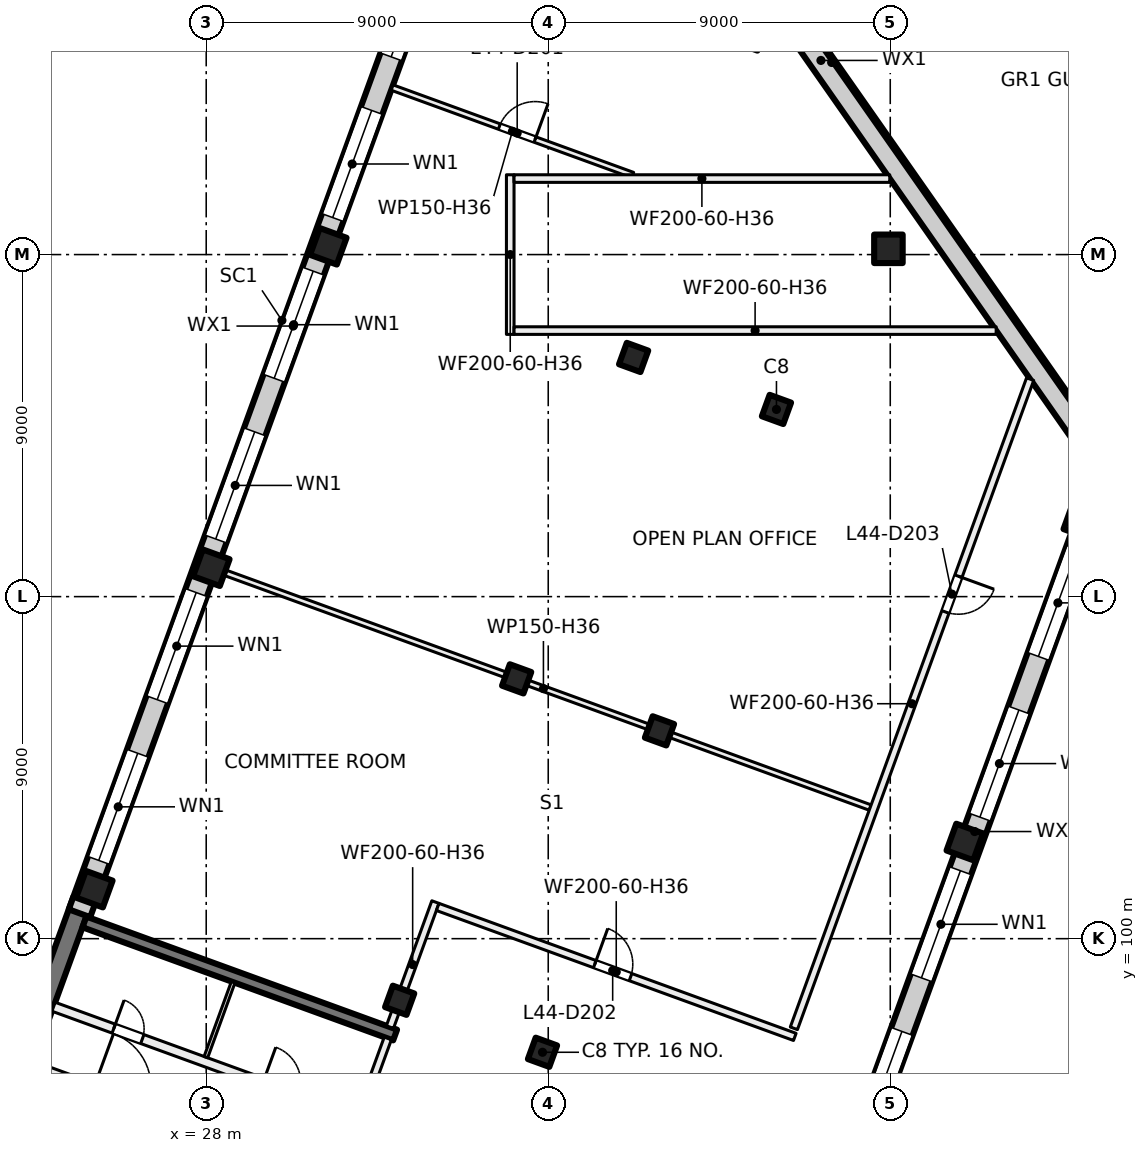
"""IFC4 building model, lengths in metres.
Left out: names, types, materials, properties, quantities, classifications, styles, units other than length and angle.
Written with IfcOpenShell. Run it as: python <this file> out.ifc"""

import sys

from ifc_helpers import new_model, si_unit, direction, frame, frame_2d, origin, origin_2d, place, context, subcontext, project, spatial, rectangle, extrude, element, fill, save


model = new_model("IFC4")
c1 = context("Model", 3, precision=1e-05, world=origin(), true_north=direction((0.0, 1.0)))
c2 = subcontext(c1, "Body", "Model", "MODEL_VIEW")
j1 = project(units=[si_unit("LENGTHUNIT", "METRE"), si_unit("PLANEANGLEUNIT", "RADIAN")], contexts=[c1])
p1 = place(None, origin())
s1 = spatial("IfcSite", under=j1, at=p1, CompositionType="ELEMENT")
p2 = place(p1, origin())
s2 = spatial("IfcBuilding", under=s1, at=p2, CompositionType="ELEMENT")
p3 = place(p2, frame((0.0, 0.0, 188.0)))
s3 = spatial("IfcBuildingStorey", under=s2, at=p3, CompositionType="ELEMENT", Elevation=188.0)
p4 = place(p3, frame((45.952, 118.152, 0.0), z_axis=(0.0, 0.0, 1.0), x_axis=(1.0, 0.0, 0.0)))
e1 = element("IfcColumn", 1, at=p4, inside=s3, PredefinedType="COLUMN", context=c2, shape_type="SweptSolid", body=[
    extrude(rectangle(XDim=0.75, YDim=0.75, at=origin_2d()), origin(), (0.0, 0.0, 1.0), 4.0),
])
for number, where, z_axis, x_axis in (
    (2, (43.006, 113.925, 0.0), (0.0, 0.0, 1.0), (-0.342, -0.94, 0.0)),
    (3, (39.927, 105.468, 0.0), (0.0, 0.0, 1.0), (-0.342, -0.94, 0.0)),
    (4, (36.849, 97.011, 0.0), (0.0, 0.0, 1.0), (-0.342, -0.94, 0.0)),
    (5, (39.247, 115.293, 0.0), (0.0, 0.0, 1.0), (-0.342, -0.94, 0.0)),
    (6, (36.169, 106.836, 0.0), (0.0, 0.0, 1.0), (-0.342, -0.94, 0.0)),
    (7, (33.091, 98.379, 0.0), (0.0, 0.0, 1.0), (-0.342, -0.94, 0.0)),
):
    element("IfcColumn", number, at=place(p3, frame(where, z_axis=z_axis, x_axis=x_axis)), inside=s3, PredefinedType="COLUMN", context=c2, shape_type="SweptSolid", body=[
        extrude(rectangle(XDim=0.6, YDim=0.6, at=origin_2d()), origin(), (0.0, 0.0, 1.0), 4.0),
    ])
for number, where, z_axis, x_axis in (
    (8, (51.04, 111.001, 0.0), (0.0, 0.0, 1.0), (-0.342, -0.94, 0.0)),
    (9, (47.962, 102.544, 0.0), (0.0, 0.0, 1.0), (-0.342, -0.94, 0.0)),
    (10, (31.212, 118.218, 0.0), (0.0, 0.0, 1.0), (-0.342, -0.94, 0.0)),
    (11, (28.134, 109.76, 0.0), (0.0, 0.0, 1.0), (-0.342, -0.94, 0.0)),
    (12, (25.056, 101.303, 0.0), (0.0, 0.0, 1.0), (-0.342, -0.94, 0.0)),
):
    element("IfcColumn", number, at=place(p3, frame(where, z_axis=z_axis, x_axis=x_axis)), inside=s3, PredefinedType="COLUMN", context=c2, shape_type="SweptSolid", body=[
        extrude(rectangle(XDim=0.75, YDim=0.75, at=origin_2d()), origin(), (0.0, 0.0, 1.0), 4.0),
    ])
p5 = place(p3, frame((21.67, 92.585, 0.0), z_axis=(0.0, 0.0, 1.0), x_axis=(0.342035714298, 0.93968695327, 0.0)))
e13 = element("IfcWall", 13, at=p5, inside=s3, PredefinedType="SHEAR", context=c2, shape_type="SweptSolid", body=[
    extrude(rectangle(XDim=8.975, YDim=0.5, at=frame_2d((4.488, 0.0))), origin(), (0.0, 0.0, 1.0), 4.0),
])
p6 = place(p3, frame((32.971, 97.465, 0.0), z_axis=(0.0, 0.0, 1.0), x_axis=(-0.939695066972, 0.34201342241, 0.0)))
e14 = element("IfcWall", 14, at=p6, inside=s3, PredefinedType="SHEAR", context=c2, shape_type="SweptSolid", body=[
    extrude(rectangle(XDim=8.7, YDim=0.3, at=frame_2d((4.35, 0.0))), origin(), (0.0, 0.0, 1.0), 4.0),
])
p7 = place(p3, frame((58.694, 117.369, 0.0), z_axis=(0.0, 0.0, 1.0), x_axis=(-0.573579564522, 0.819149853911, 0.0)))
e15 = element("IfcWall", 15, at=p7, inside=s3, PredefinedType="SOLIDWALL", context=c2, shape_type="SweptSolid", body=[
    extrude(rectangle(XDim=26.138, YDim=0.6, at=frame_2d((13.069, 0.0))), origin(), (0.0, 0.0, 1.0), 3.625),
])
p8 = place(p3, frame((51.668, 112.289, 0.0), z_axis=(0.0, 0.0, 1.0), x_axis=(-0.342020240414, -0.939692585449, 0.0)))
e16 = element("IfcWall", 16, at=p8, inside=s3, PredefinedType="SOLIDWALL", context=c2, shape_type="SweptSolid", body=[
    extrude(rectangle(XDim=20.155, YDim=0.6, at=frame_2d((10.077, 0.0))), origin(), (0.0, 0.0, 1.0), 3.625),
])
p9 = place(p8, frame((2.175, 0.0, 0.9)))
e17 = element("IfcOpeningElement", 17, at=p9, cuts=e16, PredefinedType="OPENING", context=c2, shape_type="SweptSolid", body=[
    extrude(rectangle(XDim=3.0, YDim=2.4, at=frame_2d((1.5, 1.2))), frame((0.0, 0.31, 0.0), z_axis=(0.0, -1.0, 0.0), x_axis=(1.0, 0.0, 0.0)), (0.0, 0.0, 1.0), 0.62),
])
p10 = place(p8, frame((6.675, 0.0, 0.9)))
e18 = element("IfcOpeningElement", 18, at=p10, cuts=e16, PredefinedType="OPENING", context=c2, shape_type="SweptSolid", body=[
    extrude(rectangle(XDim=3.0, YDim=2.4, at=frame_2d((1.5, 1.2))), frame((0.0, 0.31, 0.0), z_axis=(0.0, -1.0, 0.0), x_axis=(1.0, 0.0, 0.0)), (0.0, 0.0, 1.0), 0.62),
])
p11 = place(p8, frame((11.175, 0.0, 0.9)))
e19 = element("IfcOpeningElement", 19, at=p11, cuts=e16, PredefinedType="OPENING", context=c2, shape_type="SweptSolid", body=[
    extrude(rectangle(XDim=3.0, YDim=2.4, at=frame_2d((1.5, 1.2))), frame((0.0, 0.31, 0.0), z_axis=(0.0, -1.0, 0.0), x_axis=(1.0, 0.0, 0.0)), (0.0, 0.0, 1.0), 0.62),
])
p12 = place(p8, frame((15.675, 0.0, 0.9)))
e20 = element("IfcOpeningElement", 20, at=p12, cuts=e16, PredefinedType="OPENING", context=c2, shape_type="SweptSolid", body=[
    extrude(rectangle(XDim=3.0, YDim=2.4, at=frame_2d((1.5, 1.2))), frame((0.0, 0.31, 0.0), z_axis=(0.0, -1.0, 0.0), x_axis=(1.0, 0.0, 0.0)), (0.0, 0.0, 1.0), 0.62),
])
p13 = place(p3, frame((36.657, 133.847, 0.0), z_axis=(0.0, 0.0, 1.0), x_axis=(0.573575458379, -0.819152729072, 0.0)))
e21 = element("IfcWall", 21, at=p13, inside=s3, PredefinedType="SOLIDWALL", context=c2, shape_type="SweptSolid", body=[
    extrude(rectangle(XDim=26.218, YDim=0.6, at=frame_2d((13.109, 0.0))), origin(), (0.0, 0.0, 1.0), 3.625),
])
p14 = place(p3, frame((24.666, 100.669, 0.0), z_axis=(0.0, 0.0, 1.0), x_axis=(0.34201964167, 0.939692803373, 0.0)))
e22 = element("IfcWall", 22, at=p14, inside=s3, PredefinedType="SOLIDWALL", context=c2, shape_type="SweptSolid", body=[
    extrude(rectangle(XDim=32.884, YDim=0.6, at=frame_2d((16.442, 0.0))), origin(), (0.0, 0.0, 1.0), 3.625),
])
p15 = place(p14, frame((1.48, 0.0, 0.9)))
e23 = element("IfcOpeningElement", 23, at=p15, cuts=e22, PredefinedType="OPENING", context=c2, shape_type="SweptSolid", body=[
    extrude(rectangle(XDim=3.0, YDim=2.4, at=frame_2d((1.5, 1.2))), frame((0.0, 0.31, 0.0), z_axis=(0.0, -1.0, 0.0), x_axis=(1.0, 0.0, 0.0)), (0.0, 0.0, 1.0), 0.62),
])
p16 = place(p14, frame((5.98, 0.0, 0.9)))
e24 = element("IfcOpeningElement", 24, at=p16, cuts=e22, PredefinedType="OPENING", context=c2, shape_type="SweptSolid", body=[
    extrude(rectangle(XDim=3.0, YDim=2.4, at=frame_2d((1.5, 1.2))), frame((0.0, 0.31, 0.0), z_axis=(0.0, -1.0, 0.0), x_axis=(1.0, 0.0, 0.0)), (0.0, 0.0, 1.0), 0.62),
])
p17 = place(p14, frame((10.48, 0.0, 0.9)))
e25 = element("IfcOpeningElement", 25, at=p17, cuts=e22, PredefinedType="OPENING", context=c2, shape_type="SweptSolid", body=[
    extrude(rectangle(XDim=3.0, YDim=2.4, at=frame_2d((1.5, 1.2))), frame((0.0, 0.31, 0.0), z_axis=(0.0, -1.0, 0.0), x_axis=(1.0, 0.0, 0.0)), (0.0, 0.0, 1.0), 0.62),
])
p18 = place(p14, frame((14.98, 0.0, 0.9)))
e26 = element("IfcOpeningElement", 26, at=p18, cuts=e22, PredefinedType="OPENING", context=c2, shape_type="SweptSolid", body=[
    extrude(rectangle(XDim=3.0, YDim=2.4, at=frame_2d((1.5, 1.2))), frame((0.0, 0.31, 0.0), z_axis=(0.0, -1.0, 0.0), x_axis=(1.0, 0.0, 0.0)), (0.0, 0.0, 1.0), 0.62),
])
p19 = place(p14, frame((19.48, 0.0, 0.9)))
e27 = element("IfcOpeningElement", 27, at=p19, cuts=e22, PredefinedType="OPENING", context=c2, shape_type="SweptSolid", body=[
    extrude(rectangle(XDim=3.0, YDim=2.4, at=frame_2d((1.5, 1.2))), frame((0.0, 0.31, 0.0), z_axis=(0.0, -1.0, 0.0), x_axis=(1.0, 0.0, 0.0)), (0.0, 0.0, 1.0), 0.62),
])
p20 = place(p14, frame((23.98, 0.0, 0.9)))
e28 = element("IfcOpeningElement", 28, at=p20, cuts=e22, PredefinedType="OPENING", context=c2, shape_type="SweptSolid", body=[
    extrude(rectangle(XDim=3.0, YDim=2.4, at=frame_2d((1.5, 1.2))), frame((0.0, 0.31, 0.0), z_axis=(0.0, -1.0, 0.0), x_axis=(1.0, 0.0, 0.0)), (0.0, 0.0, 1.0), 0.62),
])
p21 = place(p14, frame((28.48, 0.0, 0.9)))
e29 = element("IfcOpeningElement", 29, at=p21, cuts=e22, PredefinedType="OPENING", context=c2, shape_type="SweptSolid", body=[
    extrude(rectangle(XDim=3.0, YDim=2.4, at=frame_2d((1.5, 1.2))), frame((0.0, 0.31, 0.0), z_axis=(0.0, -1.0, 0.0), x_axis=(1.0, 0.0, 0.0)), (0.0, 0.0, 1.0), 0.62),
])
p22 = place(p3, frame((31.427, 93.663, 0.0), z_axis=(0.0, 0.0, 1.0), x_axis=(0.342030870568, 0.93968871632, 0.0)))
e30 = element("IfcWall", 30, at=p22, inside=s3, PredefinedType="PARTITIONING", context=c2, shape_type="SweptSolid", body=[
    extrude(rectangle(XDim=3.95, YDim=0.2, at=frame_2d((1.975, 0.0))), origin(), (0.0, 0.0, 1.0), 3.625),
])
p23 = place(p22, frame((0.3, 0.0, 0.0)))
e31 = element("IfcOpeningElement", 31, at=p23, cuts=e30, PredefinedType="OPENING", context=c2, shape_type="SweptSolid", body=[
    extrude(rectangle(XDim=1.2, YDim=2.1, at=frame_2d((0.6, 1.05))), frame((0.0, 0.11, 0.0), z_axis=(0.0, -1.0, 0.0), x_axis=(1.0, 0.0, 0.0)), (0.0, 0.0, 1.0), 0.22),
])
p24 = place(p3, frame((23.427, 96.682, 0.0), z_axis=(0.0, 0.0, 1.0), x_axis=(0.939690465531, -0.342026064782, 0.0)))
e32 = element("IfcWall", 32, at=p24, inside=s3, PredefinedType="PARTITIONING", context=c2, shape_type="SweptSolid", body=[
    extrude(rectangle(XDim=8.45, YDim=0.2, at=frame_2d((4.225, 0.0))), origin(), (0.0, 0.0, 1.0), 3.625),
])
p25 = place(p24, frame((1.725, 0.0, 0.0)))
e33 = element("IfcOpeningElement", 33, at=p25, cuts=e32, PredefinedType="OPENING", context=c2, shape_type="SweptSolid", body=[
    extrude(rectangle(XDim=1.5, YDim=2.1, at=frame_2d((0.75, 1.05))), frame((0.0, 0.11, 0.0), z_axis=(0.0, -1.0, 0.0), x_axis=(1.0, 0.0, 0.0)), (0.0, 0.0, 1.0), 0.22),
])
p26 = place(p3, frame((23.983, 98.208, 0.0), z_axis=(0.0, 0.0, 1.0), x_axis=(0.939699751196, -0.342000552051, 0.0)))
e34 = element("IfcWall", 34, at=p26, inside=s3, PredefinedType="PARTITIONING", context=c2, shape_type="SweptSolid", body=[
    extrude(rectangle(XDim=8.45, YDim=0.25, at=frame_2d((4.225, 0.0))), origin(), (0.0, 0.0, 1.0), 3.625),
])
p27 = place(p26, frame((5.86, 0.0, 0.0)))
e35 = element("IfcOpeningElement", 35, at=p27, cuts=e34, PredefinedType="OPENING", context=c2, shape_type="SweptSolid", body=[
    extrude(rectangle(XDim=1.0, YDim=2.1, at=frame_2d((0.5, 1.05))), frame((0.0, 0.135, 0.0), z_axis=(0.0, -1.0, 0.0), x_axis=(1.0, 0.0, 0.0)), (0.0, 0.0, 1.0), 0.27),
])
p28 = place(p26, frame((1.685, 0.0, 0.0)))
e36 = element("IfcOpeningElement", 36, at=p28, cuts=e34, PredefinedType="OPENING", context=c2, shape_type="SweptSolid", body=[
    extrude(rectangle(XDim=0.8, YDim=2.1, at=frame_2d((0.4, 1.05))), frame((0.0, 0.135, 0.0), z_axis=(0.0, -1.0, 0.0), x_axis=(1.0, 0.0, 0.0)), (0.0, 0.0, 1.0), 0.27),
])
p29 = place(p3, frame((27.991, 96.883, 0.0), z_axis=(0.0, 0.0, 1.0), x_axis=(0.342023078919, 0.939691552312, 0.0)))
e37 = element("IfcWall", 37, at=p29, inside=s3, PredefinedType="PARTITIONING", context=c2, shape_type="SweptSolid", body=[
    extrude(rectangle(XDim=2.1, YDim=0.1, at=frame_2d((1.05, 0.0))), origin(), (0.0, 0.0, 1.0), 3.625),
])
p30 = place(p3, frame((28.275, 109.709, 0.0), z_axis=(0.0, 0.0, 1.0), x_axis=(0.939695619185, -0.342011905181, 0.0)))
e38 = element("IfcWall", 38, at=p30, inside=s3, PredefinedType="PARTITIONING", context=c2, shape_type="SweptSolid", body=[
    extrude(rectangle(XDim=18.301, YDim=0.15, at=frame_2d((9.15, 0.0))), origin(), (0.0, 0.0, 1.0), 3.625),
])
p31 = place(p3, frame((32.834, 97.674, 0.0), z_axis=(0.0, 0.0, 1.0), x_axis=(0.342017493073, 0.939693585395, 0.0)))
e39 = element("IfcWall", 39, at=p31, inside=s3, PredefinedType="PARTITIONING", context=c2, shape_type="SweptSolid", body=[
    extrude(rectangle(XDim=3.5, YDim=0.2, at=frame_2d((1.75, 0.0))), origin(), (0.0, 0.0, 1.0), 3.625),
])
p32 = place(p3, frame((39.223, 120.091, 0.0), z_axis=(0.0, 0.0, 1.0), x_axis=(-0.939705573142, 0.341984554924, 0.0)))
e40 = element("IfcWall", 40, at=p32, inside=s3, PredefinedType="PARTITIONING", context=c2, shape_type="SweptSolid", body=[
    extrude(rectangle(XDim=6.737, YDim=0.15, at=frame_2d((3.369, 0.0))), origin(), (0.0, 0.0, 1.0), 3.625),
])
p33 = place(p32, frame((2.735, 0.0, 0.0)))
e41 = element("IfcOpeningElement", 41, at=p33, cuts=e40, PredefinedType="OPENING", context=c2, shape_type="SweptSolid", body=[
    extrude(rectangle(XDim=1.0, YDim=2.1, at=frame_2d((0.5, 1.05))), frame((0.0, 0.085, 0.0), z_axis=(0.0, -1.0, 0.0), x_axis=(1.0, 0.0, 0.0)), (0.0, 0.0, 1.0), 0.17),
])
p34 = place(p3, frame((34.091, 100.835, 0.0), z_axis=(0.0, 0.0, 1.0), x_axis=(0.939702148643, -0.341993964619, 0.0)))
e42 = element("IfcWall", 42, at=p34, inside=s3, PredefinedType="PARTITIONING", context=c2, shape_type="SweptSolid", body=[
    extrude(rectangle(XDim=10.0, YDim=0.2, at=frame_2d((5.0, 0.0))), origin(), (0.0, 0.0, 1.0), 3.625),
])
p35 = place(p34, frame((4.4, 0.0, 0.0)))
e43 = element("IfcOpeningElement", 43, at=p35, cuts=e42, PredefinedType="OPENING", context=c2, shape_type="SweptSolid", body=[
    extrude(rectangle(XDim=1.0, YDim=2.1, at=frame_2d((0.5, 1.05))), frame((0.0, 0.11, 0.0), z_axis=(0.0, -1.0, 0.0), x_axis=(1.0, 0.0, 0.0)), (0.0, 0.0, 1.0), 0.22),
])
p36 = place(p3, frame((36.0, 115.9, 0.0), z_axis=(0.0, 0.0, 1.0), x_axis=(0.0, 1.0, 0.0)))
e44 = element("IfcWall", 44, at=p36, inside=s3, PredefinedType="PARTITIONING", context=c2, shape_type="SweptSolid", body=[
    extrude(rectangle(XDim=4.2, YDim=0.2, at=frame_2d((2.1, 0.0))), origin(), (0.0, 0.0, 1.0), 3.625),
])
p37 = place(p3, frame((36.1, 116.0, 0.0), z_axis=(0.0, 0.0, 1.0), x_axis=(1.0, 0.0, 0.0)))
e45 = element("IfcWall", 45, at=p37, inside=s3, PredefinedType="PARTITIONING", context=c2, shape_type="SweptSolid", body=[
    extrude(rectangle(XDim=12.687, YDim=0.2, at=frame_2d((6.344, 0.0))), origin(), (0.0, 0.0, 1.0), 3.625),
])
p38 = place(p3, frame((36.1, 120.0, 0.0), z_axis=(0.0, 0.0, 1.0), x_axis=(1.0, 0.0, 0.0)))
e46 = element("IfcWall", 46, at=p38, inside=s3, PredefinedType="PARTITIONING", context=c2, shape_type="SweptSolid", body=[
    extrude(rectangle(XDim=9.887, YDim=0.2, at=frame_2d((4.943, 0.0))), origin(), (0.0, 0.0, 1.0), 3.625),
])
p39 = place(p3, frame((43.464, 97.641, 0.0), z_axis=(0.0, 0.0, 1.0), x_axis=(0.341997546278, 0.939700845131, 0.0)))
e47 = element("IfcWall", 47, at=p39, inside=s3, PredefinedType="PARTITIONING", context=c2, shape_type="SweptSolid", body=[
    extrude(rectangle(XDim=18.178, YDim=0.2, at=frame_2d((9.089, 0.0))), origin(), (0.0, 0.0, 1.0), 3.625),
])
p40 = place(p39, frame((11.659, 0.0, 0.0)))
e48 = element("IfcOpeningElement", 48, at=p40, cuts=e47, PredefinedType="OPENING", context=c2, shape_type="SweptSolid", body=[
    extrude(rectangle(XDim=1.0, YDim=2.1, at=frame_2d((0.5, 1.05))), frame((0.0, 0.11, 0.0), z_axis=(0.0, -1.0, 0.0), x_axis=(1.0, 0.0, 0.0)), (0.0, 0.0, 1.0), 0.22),
])
p41 = place(p9, origin())
e49 = element("IfcWindow", 49, at=p41, inside=s3, PartitioningType="SINGLE_PANEL", PredefinedType="WINDOW", context=c2, shape_type="SweptSolid", body=[
    extrude(rectangle(XDim=3.0, YDim=2.4, at=frame_2d((1.5, 1.2))), frame((0.0, 0.03, 0.0), z_axis=(0.0, -1.0, 0.0), x_axis=(1.0, 0.0, 0.0)), (0.0, 0.0, 1.0), 0.06),
])
fill(e17, e49)
p42 = place(p10, origin())
e50 = element("IfcWindow", 50, at=p42, inside=s3, PartitioningType="SINGLE_PANEL", PredefinedType="WINDOW", context=c2, shape_type="SweptSolid", body=[
    extrude(rectangle(XDim=3.0, YDim=2.4, at=frame_2d((1.5, 1.2))), frame((0.0, 0.03, 0.0), z_axis=(0.0, -1.0, 0.0), x_axis=(1.0, 0.0, 0.0)), (0.0, 0.0, 1.0), 0.06),
])
fill(e18, e50)
p43 = place(p11, origin())
e51 = element("IfcWindow", 51, at=p43, inside=s3, PartitioningType="SINGLE_PANEL", PredefinedType="WINDOW", context=c2, shape_type="SweptSolid", body=[
    extrude(rectangle(XDim=3.0, YDim=2.4, at=frame_2d((1.5, 1.2))), frame((0.0, 0.03, 0.0), z_axis=(0.0, -1.0, 0.0), x_axis=(1.0, 0.0, 0.0)), (0.0, 0.0, 1.0), 0.06),
])
fill(e19, e51)
p44 = place(p12, origin())
e52 = element("IfcWindow", 52, at=p44, inside=s3, PartitioningType="SINGLE_PANEL", PredefinedType="WINDOW", context=c2, shape_type="SweptSolid", body=[
    extrude(rectangle(XDim=3.0, YDim=2.4, at=frame_2d((1.5, 1.2))), frame((0.0, 0.03, 0.0), z_axis=(0.0, -1.0, 0.0), x_axis=(1.0, 0.0, 0.0)), (0.0, 0.0, 1.0), 0.06),
])
fill(e20, e52)
p45 = place(p15, origin())
e53 = element("IfcWindow", 53, at=p45, inside=s3, PartitioningType="SINGLE_PANEL", PredefinedType="WINDOW", context=c2, shape_type="SweptSolid", body=[
    extrude(rectangle(XDim=3.0, YDim=2.4, at=frame_2d((1.5, 1.2))), frame((0.0, 0.03, 0.0), z_axis=(0.0, -1.0, 0.0), x_axis=(1.0, 0.0, 0.0)), (0.0, 0.0, 1.0), 0.06),
])
fill(e23, e53)
p46 = place(p16, origin())
e54 = element("IfcWindow", 54, at=p46, inside=s3, PartitioningType="SINGLE_PANEL", PredefinedType="WINDOW", context=c2, shape_type="SweptSolid", body=[
    extrude(rectangle(XDim=3.0, YDim=2.4, at=frame_2d((1.5, 1.2))), frame((0.0, 0.03, 0.0), z_axis=(0.0, -1.0, 0.0), x_axis=(1.0, 0.0, 0.0)), (0.0, 0.0, 1.0), 0.06),
])
fill(e24, e54)
p47 = place(p17, origin())
e55 = element("IfcWindow", 55, at=p47, inside=s3, PartitioningType="SINGLE_PANEL", PredefinedType="WINDOW", context=c2, shape_type="SweptSolid", body=[
    extrude(rectangle(XDim=3.0, YDim=2.4, at=frame_2d((1.5, 1.2))), frame((0.0, 0.03, 0.0), z_axis=(0.0, -1.0, 0.0), x_axis=(1.0, 0.0, 0.0)), (0.0, 0.0, 1.0), 0.06),
])
fill(e25, e55)
p48 = place(p18, origin())
e56 = element("IfcWindow", 56, at=p48, inside=s3, PartitioningType="SINGLE_PANEL", PredefinedType="WINDOW", context=c2, shape_type="SweptSolid", body=[
    extrude(rectangle(XDim=3.0, YDim=2.4, at=frame_2d((1.5, 1.2))), frame((0.0, 0.03, 0.0), z_axis=(0.0, -1.0, 0.0), x_axis=(1.0, 0.0, 0.0)), (0.0, 0.0, 1.0), 0.06),
])
fill(e26, e56)
p49 = place(p19, origin())
e57 = element("IfcWindow", 57, at=p49, inside=s3, PartitioningType="SINGLE_PANEL", PredefinedType="WINDOW", context=c2, shape_type="SweptSolid", body=[
    extrude(rectangle(XDim=3.0, YDim=2.4, at=frame_2d((1.5, 1.2))), frame((0.0, 0.03, 0.0), z_axis=(0.0, -1.0, 0.0), x_axis=(1.0, 0.0, 0.0)), (0.0, 0.0, 1.0), 0.06),
])
fill(e27, e57)
p50 = place(p20, origin())
e58 = element("IfcWindow", 58, at=p50, inside=s3, PartitioningType="SINGLE_PANEL", PredefinedType="WINDOW", context=c2, shape_type="SweptSolid", body=[
    extrude(rectangle(XDim=3.0, YDim=2.4, at=frame_2d((1.5, 1.2))), frame((0.0, 0.03, 0.0), z_axis=(0.0, -1.0, 0.0), x_axis=(1.0, 0.0, 0.0)), (0.0, 0.0, 1.0), 0.06),
])
fill(e28, e58)
p51 = place(p28, origin())
e59 = element("IfcDoor", 59, at=p51, inside=s3, OperationType="SINGLE_SWING_RIGHT", PredefinedType="DOOR", context=c2, shape_type="SweptSolid", body=[
    extrude(rectangle(XDim=0.8, YDim=2.1, at=frame_2d((0.4, 1.05))), frame((0.0, 0.025, 0.0), z_axis=(0.0, -1.0, 0.0), x_axis=(1.0, 0.0, 0.0)), (0.0, 0.0, 1.0), 0.05),
])
fill(e36, e59)
p52 = place(p33, origin())
e60 = element("IfcDoor", 60, at=p52, inside=s3, OperationType="SINGLE_SWING_LEFT", PredefinedType="DOOR", context=c2, shape_type="SweptSolid", body=[
    extrude(rectangle(XDim=1.0, YDim=2.1, at=frame_2d((0.5, 1.05))), frame((0.0, 0.025, 0.0), z_axis=(0.0, -1.0, 0.0), x_axis=(1.0, 0.0, 0.0)), (0.0, 0.0, 1.0), 0.05),
])
fill(e41, e60)
p53 = place(p35, origin())
e61 = element("IfcDoor", 61, at=p53, inside=s3, OperationType="SINGLE_SWING_LEFT", PredefinedType="DOOR", context=c2, shape_type="SweptSolid", body=[
    extrude(rectangle(XDim=1.0, YDim=2.1, at=frame_2d((0.5, 1.05))), frame((0.0, 0.025, 0.0), z_axis=(0.0, -1.0, 0.0), x_axis=(1.0, 0.0, 0.0)), (0.0, 0.0, 1.0), 0.05),
])
fill(e43, e61)
p54 = place(p40, origin())
e62 = element("IfcDoor", 62, at=p54, inside=s3, OperationType="SINGLE_SWING_RIGHT", PredefinedType="DOOR", context=c2, shape_type="SweptSolid", body=[
    extrude(rectangle(XDim=1.0, YDim=2.1, at=frame_2d((0.5, 1.05))), frame((0.0, 0.025, 0.0), z_axis=(0.0, -1.0, 0.0), x_axis=(1.0, 0.0, 0.0)), (0.0, 0.0, 1.0), 0.05),
])
fill(e48, e62)
save(model, sys.argv[1])
